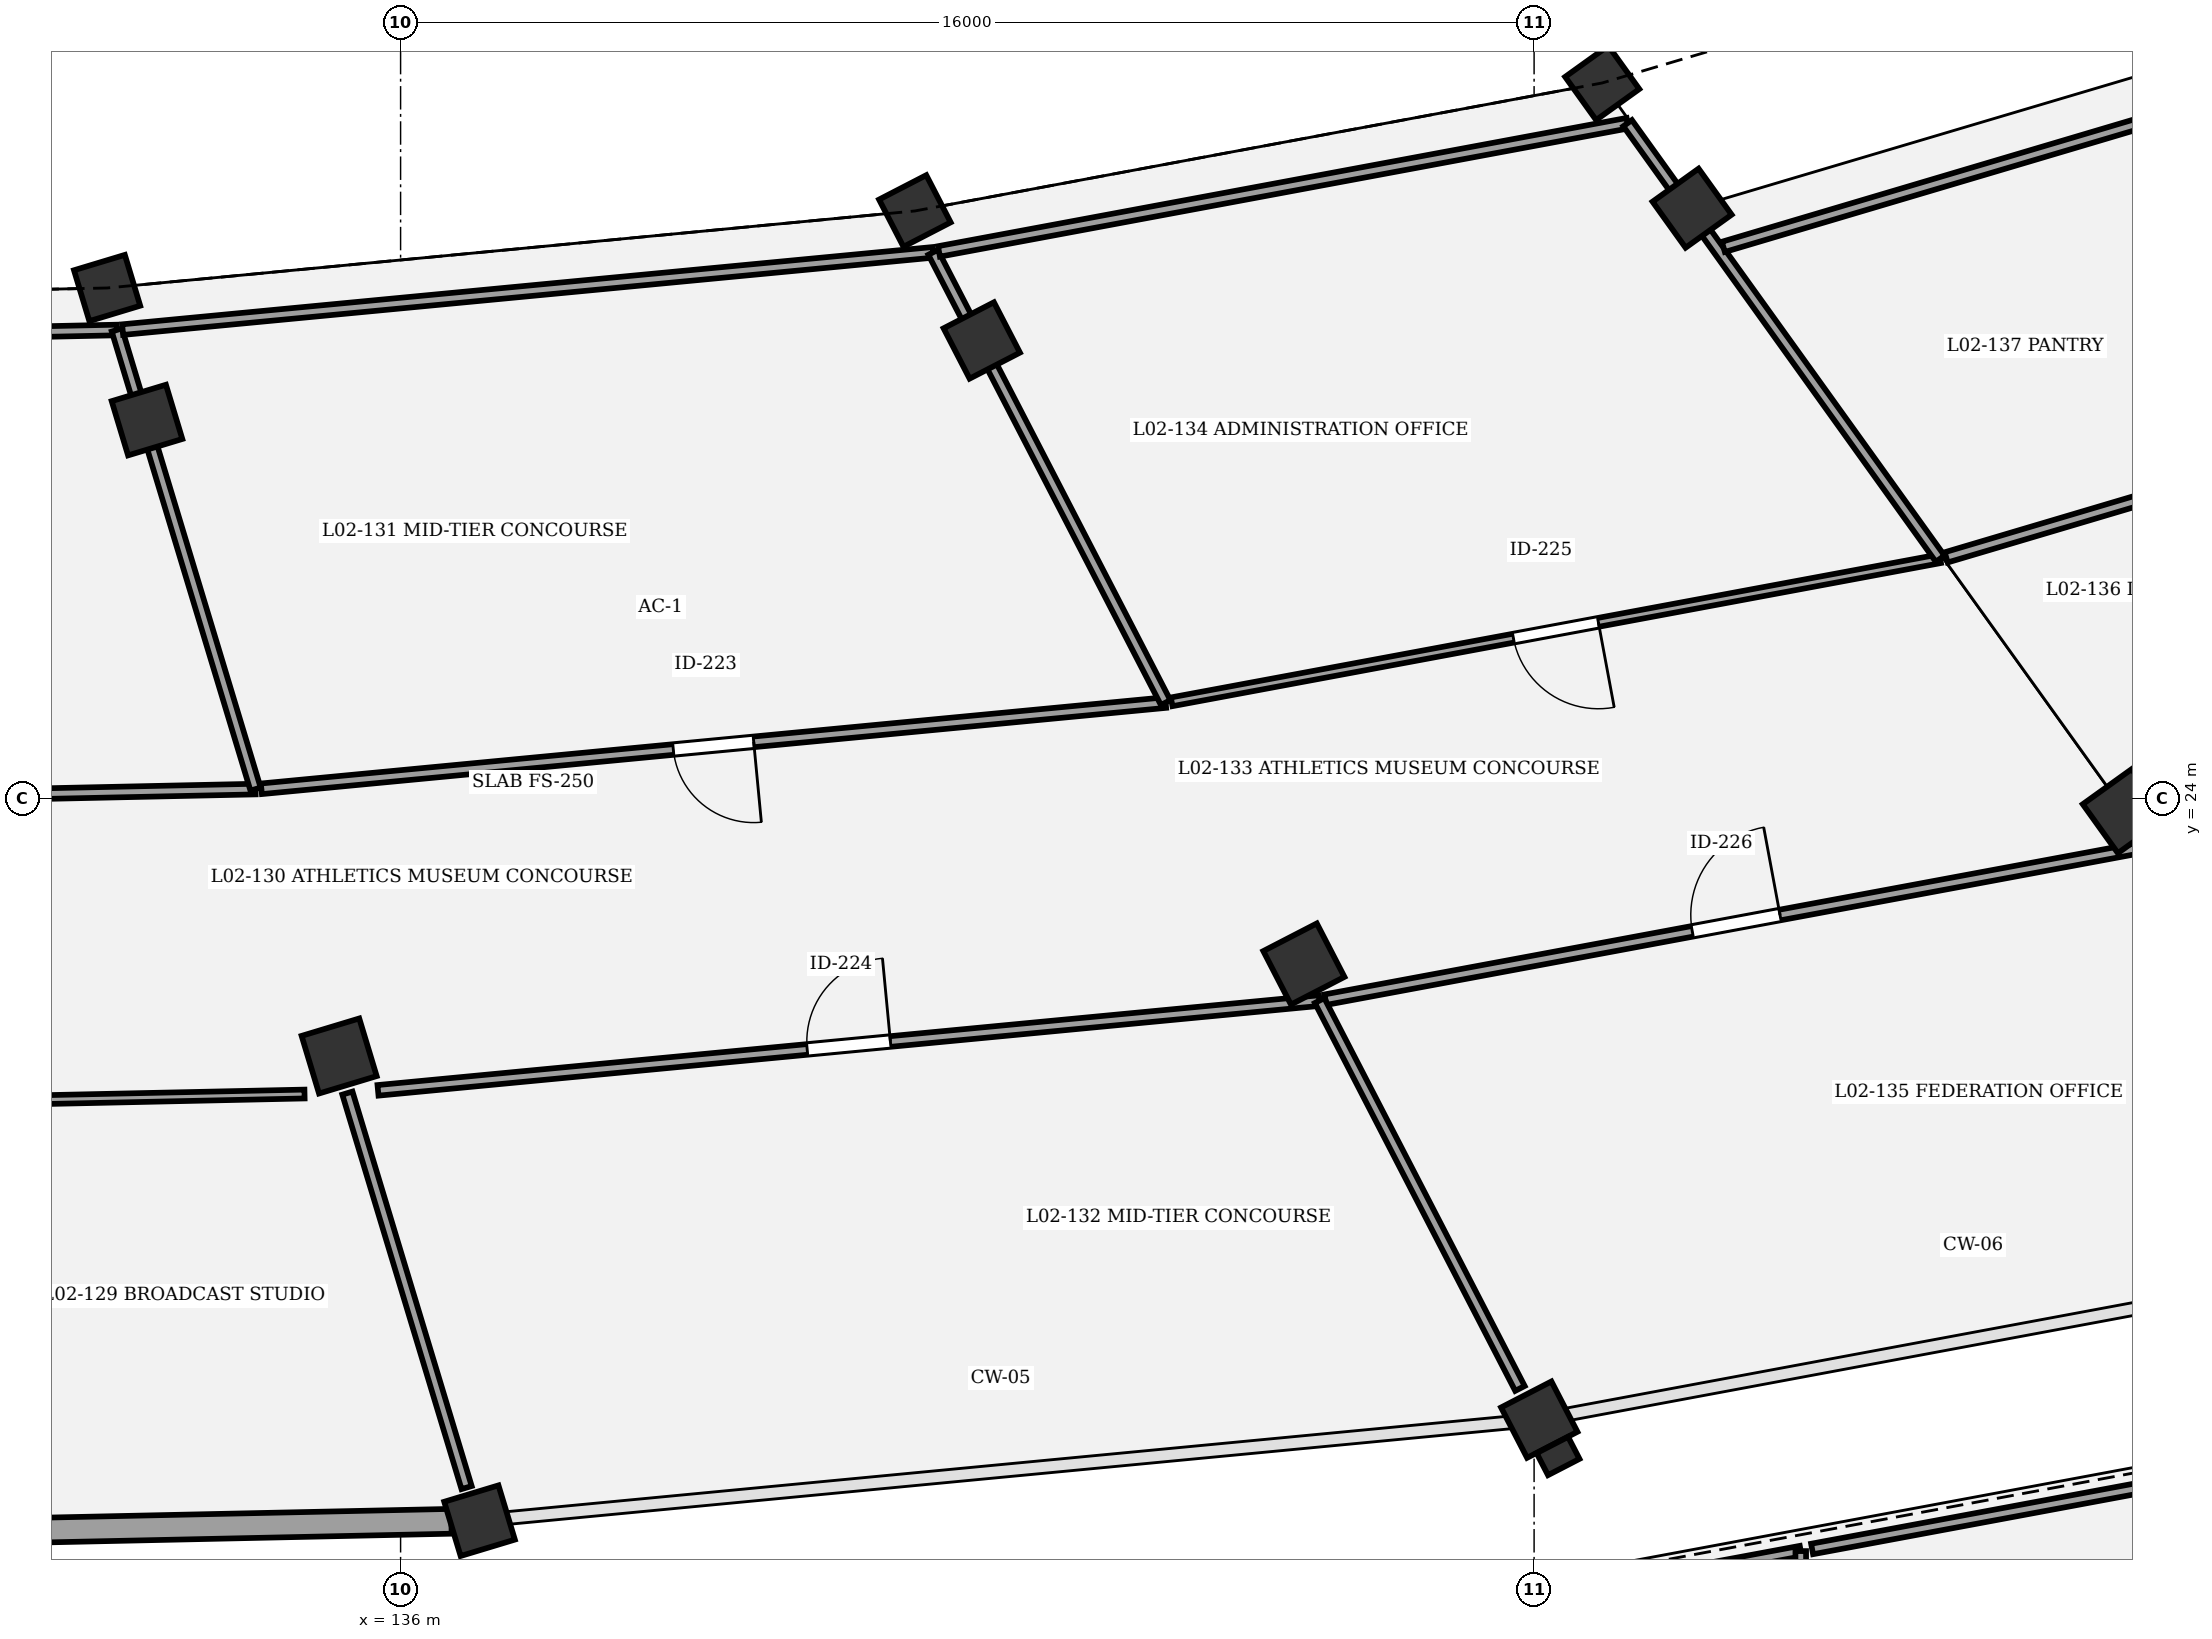
"""IFC4 building model, lengths in metres.
Left out: names, types, materials, properties, quantities, classifications, styles, units other than length and angle.
Written with IfcOpenShell. Run it as: python <this file> out.ifc"""

import sys

from ifc_helpers import new_model, si_unit, direction, frame, frame_2d, origin, origin_2d, place, context, subcontext, project, spatial, rectangle, extrude, element, fill, save


model = new_model("IFC4")
c1 = context("Model", 3, precision=1e-05, world=origin(), true_north=direction((0.0, 1.0)))
c2 = subcontext(c1, "Body", "Model", "MODEL_VIEW")
j1 = project(units=[si_unit("LENGTHUNIT", "METRE"), si_unit("PLANEANGLEUNIT", "RADIAN")], contexts=[c1])
p1 = place(None, origin())
s1 = spatial("IfcSite", under=j1, at=p1, CompositionType="ELEMENT")
p2 = place(p1, origin())
s2 = spatial("IfcBuilding", under=s1, at=p2, CompositionType="ELEMENT")
p3 = place(p2, frame((0.0, 0.0, 10.2)))
s3 = spatial("IfcBuildingStorey", under=s2, at=p3, CompositionType="ELEMENT", Elevation=10.2)
p4 = place(p3, frame((131.857, 31.207, 0.0), z_axis=(0.0, 0.0, 1.0), x_axis=(0.289198876314, -0.957269037387, 0.0)))
e1 = element("IfcColumn", 1, at=p4, inside=s3, PredefinedType="COLUMN", context=c2, shape_type="SweptSolid", body=[
    extrude(rectangle(XDim=0.75, YDim=0.75, at=origin_2d()), origin(), (0.0, 0.0, 1.0), 4.5),
])
p5 = place(p3, frame((132.42, 29.343, 0.0), z_axis=(0.0, 0.0, 1.0), x_axis=(0.289198876314, -0.957269037387, 0.0)))
e2 = element("IfcColumn", 2, at=p5, inside=s3, PredefinedType="COLUMN", context=c2, shape_type="SweptSolid", body=[
    extrude(rectangle(XDim=0.8, YDim=0.8, at=origin_2d()), origin(), (0.0, 0.0, 1.0), 4.5),
])
p6 = place(p3, frame((135.133, 20.366, 0.0), z_axis=(0.0, 0.0, 1.0), x_axis=(0.289198876314, -0.957269037387, 0.0)))
e3 = element("IfcColumn", 3, at=p6, inside=s3, PredefinedType="COLUMN", context=c2, shape_type="SweptSolid", body=[
    extrude(rectangle(XDim=0.85, YDim=0.85, at=origin_2d()), origin(), (0.0, 0.0, 1.0), 4.5),
])
p7 = place(p3, frame((137.115, 13.806, 0.0), z_axis=(0.0, 0.0, 1.0), x_axis=(0.289198876314, -0.957269037387, 0.0)))
e4 = element("IfcColumn", 4, at=p7, inside=s3, PredefinedType="COLUMN", context=c2, shape_type="SweptSolid", body=[
    extrude(rectangle(XDim=0.8, YDim=0.8, at=origin_2d()), origin(), (0.0, 0.0, 1.0), 4.5),
])
p8 = place(p3, frame((143.259, 32.294, 0.0), z_axis=(0.0, 0.0, 1.0), x_axis=(0.458959712465, -0.888457079624, 0.0)))
e5 = element("IfcColumn", 5, at=p8, inside=s3, PredefinedType="COLUMN", context=c2, shape_type="SweptSolid", body=[
    extrude(rectangle(XDim=0.75, YDim=0.75, at=origin_2d()), origin(), (0.0, 0.0, 1.0), 4.5),
])
p9 = place(p3, frame((144.204, 30.466, 0.0), z_axis=(0.0, 0.0, 1.0), x_axis=(0.458959712465, -0.888457079624, 0.0)))
e6 = element("IfcColumn", 6, at=p9, inside=s3, PredefinedType="COLUMN", context=c2, shape_type="SweptSolid", body=[
    extrude(rectangle(XDim=0.8, YDim=0.8, at=origin_2d()), origin(), (0.0, 0.0, 1.0), 4.5),
])
p10 = place(p3, frame((148.75, 21.665, 0.0), z_axis=(0.0, 0.0, 1.0), x_axis=(0.458959712465, -0.888457079624, 0.0)))
e7 = element("IfcColumn", 7, at=p10, inside=s3, PredefinedType="COLUMN", context=c2, shape_type="SweptSolid", body=[
    extrude(rectangle(XDim=0.85, YDim=0.85, at=origin_2d()), origin(), (0.0, 0.0, 1.0), 4.5),
])
p11 = place(p3, frame((152.073, 15.233, 0.0), z_axis=(0.0, 0.0, 1.0), x_axis=(0.458959712465, -0.888457079624, 0.0)))
e8 = element("IfcColumn", 8, at=p11, inside=s3, PredefinedType="COLUMN", context=c2, shape_type="SweptSolid", body=[
    extrude(rectangle(XDim=0.8, YDim=0.8, at=origin_2d()), origin(), (0.0, 0.0, 1.0), 4.5),
])
p12 = place(p3, frame((152.338, 14.719, 0.0), z_axis=(0.0, 0.0, 1.0), x_axis=(0.888457079624, 0.458959712465, 0.0)))
e9 = element("IfcColumn", 9, at=p12, inside=s3, PredefinedType="PILASTER", context=c2, shape_type="SweptSolid", body=[
    extrude(rectangle(XDim=0.5, YDim=0.35, at=origin_2d()), origin(), (0.0, 0.0, 1.0), 4.5),
])
p13 = place(p3, frame((152.962, 34.101, 0.0), z_axis=(0.0, 0.0, 1.0), x_axis=(0.582974127943, -0.812490717577, 0.0)))
e10 = element("IfcColumn", 10, at=p13, inside=s3, PredefinedType="COLUMN", context=c2, shape_type="SweptSolid", body=[
    extrude(rectangle(XDim=0.75, YDim=0.75, at=origin_2d()), origin(), (0.0, 0.0, 1.0), 4.5),
])
p14 = place(p3, frame((154.23, 32.333, 0.0), z_axis=(0.0, 0.0, 1.0), x_axis=(0.582974127943, -0.812490717577, 0.0)))
e11 = element("IfcColumn", 11, at=p14, inside=s3, PredefinedType="COLUMN", context=c2, shape_type="SweptSolid", body=[
    extrude(rectangle(XDim=0.8, YDim=0.8, at=origin_2d()), origin(), (0.0, 0.0, 1.0), 4.5),
])
p15 = place(p3, frame((160.338, 23.823, 0.0), z_axis=(0.0, 0.0, 1.0), x_axis=(0.582974127943, -0.812490717577, 0.0)))
e12 = element("IfcColumn", 12, at=p15, inside=s3, PredefinedType="COLUMN", context=c2, shape_type="SweptSolid", body=[
    extrude(rectangle(XDim=0.85, YDim=0.85, at=origin_2d()), origin(), (0.0, 0.0, 1.0), 4.5),
])
p16 = place(p3, frame((115.398, 13.339, 0.0), z_axis=(0.0, 0.0, 1.0), x_axis=(0.999768320606, 0.021524523519, 0.0)))
e13 = element("IfcWall", 13, at=p16, inside=s3, PredefinedType="STANDARD", context=c2, shape_type="SweptSolid", body=[
    extrude(rectangle(XDim=21.324, YDim=0.35, at=frame_2d((10.662, 0.0))), origin(), (0.0, 0.0, 1.0), 3.42),
])
p17 = place(p16, frame((9.692, 0.0, 0.9)))
e14 = element("IfcOpeningElement", 14, at=p17, cuts=e13, PredefinedType="OPENING", context=c2, shape_type="SweptSolid", body=[
    extrude(rectangle(XDim=1.94, YDim=1.95, at=frame_2d((0.97, 0.975))), frame((0.0, 0.185, 0.0), z_axis=(0.0, -1.0, 0.0), x_axis=(1.0, 0.0, 0.0)), (0.0, 0.0, 1.0), 0.37),
])
p18 = place(p3, frame((133.953, 24.134, 0.0), z_axis=(0.0, 0.0, 1.0), x_axis=(-0.999768266483, -0.021527037261, 0.0)))
e15 = element("IfcWall", 15, at=p18, inside=s3, PredefinedType="PARTITIONING", context=c2, shape_type="SweptSolid", body=[
    extrude(rectangle(XDim=18.917, YDim=0.15, at=frame_2d((9.458, 0.0))), origin(), (0.0, 0.0, 1.0), 3.25),
])
p19 = place(p18, frame((8.928, 0.0, 0.0)))
e16 = element("IfcOpeningElement", 16, at=p19, cuts=e15, PredefinedType="OPENING", context=c2, shape_type="SweptSolid", body=[
    extrude(rectangle(XDim=1.06, YDim=2.1, at=frame_2d((0.53, 1.05))), frame((0.0, 0.085, 0.0), z_axis=(0.0, -1.0, 0.0), x_axis=(1.0, 0.0, 0.0)), (0.0, 0.0, 1.0), 0.17),
])
p20 = place(p3, frame((115.511, 19.417, 0.0), z_axis=(0.0, 0.0, 1.0), x_axis=(0.999768107727, 0.021534409017, 0.0)))
e17 = element("IfcWall", 17, at=p20, inside=s3, PredefinedType="PARTITIONING", context=c2, shape_type="SweptSolid", body=[
    extrude(rectangle(XDim=19.137, YDim=0.125, at=frame_2d((9.569, 0.0))), origin(), (0.0, 0.0, 1.0), 3.25),
])
p21 = place(p20, frame((9.019, 0.0, 0.0)))
e18 = element("IfcOpeningElement", 18, at=p21, cuts=e17, PredefinedType="OPENING", context=c2, shape_type="SweptSolid", body=[
    extrude(rectangle(XDim=1.1, YDim=2.1, at=frame_2d((0.55, 1.05))), frame((0.0, 0.073, 0.0), z_axis=(0.0, -1.0, 0.0), x_axis=(1.0, 0.0, 0.0)), (0.0, 0.0, 1.0), 0.145),
])
p22 = place(p3, frame((146.799, 25.355, 0.0), z_axis=(0.0, 0.0, 1.0), x_axis=(-0.995485111947, -0.094917816515, 0.0)))
e19 = element("IfcWall", 19, at=p22, inside=s3, PredefinedType="PARTITIONING", context=c2, shape_type="SweptSolid", body=[
    extrude(rectangle(XDim=12.822, YDim=0.15, at=frame_2d((6.411, 0.0))), origin(), (0.0, 0.0, 1.0), 3.25),
])
p23 = place(p22, frame((5.841, 0.0, 0.0)))
e20 = element("IfcOpeningElement", 20, at=p23, cuts=e19, PredefinedType="OPENING", context=c2, shape_type="SweptSolid", body=[
    extrude(rectangle(XDim=1.14, YDim=2.1, at=frame_2d((0.57, 1.05))), frame((0.0, 0.085, 0.0), z_axis=(0.0, -1.0, 0.0), x_axis=(1.0, 0.0, 0.0)), (0.0, 0.0, 1.0), 0.17),
])
p24 = place(p3, frame((135.681, 19.881, 0.0), z_axis=(0.0, 0.0, 1.0), x_axis=(0.995484535327, 0.094923863827, 0.0)))
e21 = element("IfcWall", 21, at=p24, inside=s3, PredefinedType="PARTITIONING", context=c2, shape_type="SweptSolid", body=[
    extrude(rectangle(XDim=13.351, YDim=0.15, at=frame_2d((6.676, 0.0))), origin(), (0.0, 0.0, 1.0), 3.25),
])
p25 = place(p24, frame((6.085, 0.0, 0.0)))
e22 = element("IfcOpeningElement", 22, at=p25, cuts=e21, PredefinedType="OPENING", context=c2, shape_type="SweptSolid", body=[
    extrude(rectangle(XDim=1.18, YDim=2.1, at=frame_2d((0.59, 1.05))), frame((0.0, 0.085, 0.0), z_axis=(0.0, -1.0, 0.0), x_axis=(1.0, 0.0, 0.0)), (0.0, 0.0, 1.0), 0.17),
])
p26 = place(p3, frame((157.732, 27.386, 0.0), z_axis=(0.0, 0.0, 1.0), x_axis=(-0.983097372707, -0.183083466695, 0.0)))
e23 = element("IfcWall", 23, at=p26, inside=s3, PredefinedType="PARTITIONING", context=c2, shape_type="SweptSolid", body=[
    extrude(rectangle(XDim=11.035, YDim=0.125, at=frame_2d((5.517, 0.0))), origin(), (0.0, 0.0, 1.0), 3.25),
])
p27 = place(p26, frame((4.907, 0.0, 0.0)))
e24 = element("IfcOpeningElement", 24, at=p27, cuts=e23, PredefinedType="OPENING", context=c2, shape_type="SweptSolid", body=[
    extrude(rectangle(XDim=1.22, YDim=2.1, at=frame_2d((0.61, 1.05))), frame((0.0, 0.073, 0.0), z_axis=(0.0, -1.0, 0.0), x_axis=(1.0, 0.0, 0.0)), (0.0, 0.0, 1.0), 0.145),
])
p28 = place(p3, frame((149.055, 21.161, 0.0), z_axis=(0.0, 0.0, 1.0), x_axis=(0.983095748229, 0.183092189385, 0.0)))
e25 = element("IfcWall", 25, at=p28, inside=s3, PredefinedType="PARTITIONING", context=c2, shape_type="SweptSolid", body=[
    extrude(rectangle(XDim=11.793, YDim=0.15, at=frame_2d((5.896, 0.0))), origin(), (0.0, 0.0, 1.0), 3.25),
])
p29 = place(p28, frame((5.267, 0.0, 0.0)))
e26 = element("IfcOpeningElement", 26, at=p29, cuts=e25, PredefinedType="OPENING", context=c2, shape_type="SweptSolid", body=[
    extrude(rectangle(XDim=1.26, YDim=2.1, at=frame_2d((0.63, 1.05))), frame((0.0, 0.085, 0.0), z_axis=(0.0, -1.0, 0.0), x_axis=(1.0, 0.0, 0.0)), (0.0, 0.0, 1.0), 0.17),
])
p30 = place(p3, frame((167.299, 30.219, 0.0), z_axis=(0.0, 0.0, 1.0), x_axis=(-0.958655809656, -0.284568161629, 0.0)))
e27 = element("IfcWall", 27, at=p30, inside=s3, PredefinedType="PARTITIONING", context=c2, shape_type="SweptSolid", body=[
    extrude(rectangle(XDim=9.891, YDim=0.15, at=frame_2d((4.946, 0.0))), origin(), (0.0, 0.0, 1.0), 3.25),
])
p31 = place(p30, frame((3.096, 0.0, 0.0)))
e28 = element("IfcOpeningElement", 28, at=p31, cuts=e27, PredefinedType="OPENING", context=c2, shape_type="SweptSolid", body=[
    extrude(rectangle(XDim=1.32, YDim=2.1, at=frame_2d((0.66, 1.05))), frame((0.0, 0.085, 0.0), z_axis=(0.0, -1.0, 0.0), x_axis=(1.0, 0.0, 0.0)), (0.0, 0.0, 1.0), 0.17),
])
p32 = place(p3, frame((115.04, 30.249, 0.0), z_axis=(0.0, 0.0, 1.0), x_axis=(0.99976805362, 0.021536920891, 0.0)))
e29 = element("IfcWall", 29, at=p32, inside=s3, PredefinedType="PARTITIONING", context=c2, shape_type="SweptSolid", body=[
    extrude(rectangle(XDim=16.958, YDim=0.15, at=frame_2d((8.479, 0.0))), origin(), (0.0, 0.0, 1.0), 3.25),
])
p33 = place(p3, frame((131.995, 30.614, 0.0), z_axis=(0.0, 0.0, 1.0), x_axis=(0.289226587364, -0.957260665212, 0.0)))
e30 = element("IfcWall", 30, at=p33, inside=s3, PredefinedType="PARTITIONING", context=c2, shape_type="SweptSolid", body=[
    extrude(rectangle(XDim=6.77, YDim=0.15, at=frame_2d((3.385, 0.0))), origin(), (0.0, 0.0, 1.0), 3.25),
])
p34 = place(p3, frame((135.249, 19.842, 0.0), z_axis=(0.0, 0.0, 1.0), x_axis=(0.289195444178, -0.957270074256, 0.0)))
e31 = element("IfcWall", 31, at=p34, inside=s3, PredefinedType="PARTITIONING", context=c2, shape_type="SweptSolid", body=[
    extrude(rectangle(XDim=5.817, YDim=0.15, at=frame_2d((2.909, 0.0))), origin(), (0.0, 0.0, 1.0), 3.25),
])
p35 = place(p3, frame((132.076, 30.619, 0.0), z_axis=(0.0, 0.0, 1.0), x_axis=(0.995484580871, 0.094923386203, 0.0)))
e32 = element("IfcWall", 32, at=p35, inside=s3, PredefinedType="PARTITIONING", context=c2, shape_type="SweptSolid", body=[
    extrude(rectangle(XDim=11.492, YDim=0.15, at=frame_2d((5.746, 0.0))), origin(), (0.0, 0.0, 1.0), 3.25),
])
p36 = place(p3, frame((143.516, 31.71, 0.0), z_axis=(0.0, 0.0, 1.0), x_axis=(0.458942826051, -0.888465802615, 0.0)))
e33 = element("IfcWall", 33, at=p36, inside=s3, PredefinedType="PARTITIONING", context=c2, shape_type="SweptSolid", body=[
    extrude(rectangle(XDim=7.153, YDim=0.15, at=frame_2d((3.577, 0.0))), origin(), (0.0, 0.0, 1.0), 3.25),
])
p37 = place(p3, frame((148.972, 21.148, 0.0), z_axis=(0.0, 0.0, 1.0), x_axis=(0.45896480759, -0.888454447563, 0.0)))
e34 = element("IfcWall", 34, at=p37, inside=s3, PredefinedType="PARTITIONING", context=c2, shape_type="SweptSolid", body=[
    extrude(rectangle(XDim=6.163, YDim=0.15, at=frame_2d((3.081, 0.0))), origin(), (0.0, 0.0, 1.0), 3.25),
])
p38 = place(p3, frame((143.599, 31.723, 0.0), z_axis=(0.0, 0.0, 1.0), x_axis=(0.98309647403, 0.183088292225, 0.0)))
e35 = element("IfcWall", 35, at=p38, inside=s3, PredefinedType="PARTITIONING", context=c2, shape_type="SweptSolid", body=[
    extrude(rectangle(XDim=9.888, YDim=0.15, at=frame_2d((4.944, 0.0))), origin(), (0.0, 0.0, 1.0), 3.25),
])
p39 = place(p3, frame((153.32, 33.533, 0.0), z_axis=(0.0, 0.0, 1.0), x_axis=(0.583043547447, -0.812440903562, 0.0)))
e36 = element("IfcWall", 36, at=p39, inside=s3, PredefinedType="PARTITIONING", context=c2, shape_type="SweptSolid", body=[
    extrude(rectangle(XDim=7.567, YDim=0.15, at=frame_2d((3.783, 0.0))), origin(), (0.0, 0.0, 1.0), 3.25),
])
p40 = place(p3, frame((154.671, 31.788, 0.0), z_axis=(0.0, 0.0, 1.0), x_axis=(0.958661639872, 0.284548520005, 0.0)))
e37 = element("IfcWall", 37, at=p40, inside=s3, PredefinedType="PARTITIONING", context=c2, shape_type="SweptSolid", body=[
    extrude(rectangle(XDim=9.157, YDim=0.15, at=frame_2d((4.579, 0.0))), origin(), (0.0, 0.0, 1.0), 3.25),
])
p41 = place(p3, frame((152.531, 12.775, 0.0), z_axis=(0.0, 0.0, 1.0), x_axis=(0.983089981796, 0.18312314898, 0.0)))
e38 = element("IfcWall", 38, at=p41, inside=s3, PredefinedType="PARTITIONING", context=c2, shape_type="SweptSolid", body=[
    extrude(rectangle(XDim=3.289, YDim=0.15, at=frame_2d((1.645, 0.0))), origin(), (0.0, 0.0, 1.0), 3.25),
])
p42 = place(p3, frame((155.764, 13.377, 0.0), z_axis=(0.0, 0.0, 1.0), x_axis=(0.0, -1.0, 0.0)))
e39 = element("IfcWall", 39, at=p42, inside=s3, PredefinedType="PARTITIONING", context=c2, shape_type="SweptSolid", body=[
    extrude(rectangle(XDim=8.817, YDim=0.15, at=frame_2d((4.409, 0.0))), origin(), (0.0, 0.0, 1.0), 3.25),
])
p43 = place(p3, frame((155.924, 13.407, 0.0), z_axis=(0.0, 0.0, 1.0), x_axis=(0.983095301178, 0.183094589766, 0.0)))
e40 = element("IfcWall", 40, at=p43, inside=s3, PredefinedType="PARTITIONING", context=c2, shape_type="SweptSolid", body=[
    extrude(rectangle(XDim=9.495, YDim=0.15, at=frame_2d((4.748, 0.0))), origin(), (0.0, 0.0, 1.0), 3.25),
])
p44 = place(p23, origin())
e41 = element("IfcDoor", 41, at=p44, inside=s3, OperationType="SINGLE_SWING_LEFT", PredefinedType="DOOR", context=c2, shape_type="SweptSolid", body=[
    extrude(rectangle(XDim=1.14, YDim=2.1, at=frame_2d((0.57, 1.05))), frame((0.0, 0.025, 0.0), z_axis=(0.0, -1.0, 0.0), x_axis=(1.0, 0.0, 0.0)), (0.0, 0.0, 1.0), 0.05),
])
fill(e20, e41)
p45 = place(p25, origin())
e42 = element("IfcDoor", 42, at=p45, inside=s3, OperationType="SINGLE_SWING_RIGHT", PredefinedType="DOOR", context=c2, shape_type="SweptSolid", body=[
    extrude(rectangle(XDim=1.18, YDim=2.1, at=frame_2d((0.59, 1.05))), frame((0.0, 0.025, 0.0), z_axis=(0.0, -1.0, 0.0), x_axis=(1.0, 0.0, 0.0)), (0.0, 0.0, 1.0), 0.05),
])
fill(e22, e42)
p46 = place(p27, origin())
e43 = element("IfcDoor", 43, at=p46, inside=s3, OperationType="SINGLE_SWING_LEFT", PredefinedType="DOOR", context=c2, shape_type="SweptSolid", body=[
    extrude(rectangle(XDim=1.22, YDim=2.1, at=frame_2d((0.61, 1.05))), frame((0.0, 0.025, 0.0), z_axis=(0.0, -1.0, 0.0), x_axis=(1.0, 0.0, 0.0)), (0.0, 0.0, 1.0), 0.05),
])
fill(e24, e43)
p47 = place(p29, origin())
e44 = element("IfcDoor", 44, at=p47, inside=s3, OperationType="SINGLE_SWING_RIGHT", PredefinedType="DOOR", context=c2, shape_type="SweptSolid", body=[
    extrude(rectangle(XDim=1.26, YDim=2.1, at=frame_2d((0.63, 1.05))), frame((0.0, 0.025, 0.0), z_axis=(0.0, -1.0, 0.0), x_axis=(1.0, 0.0, 0.0)), (0.0, 0.0, 1.0), 0.05),
])
fill(e26, e44)
save(model, sys.argv[1])
